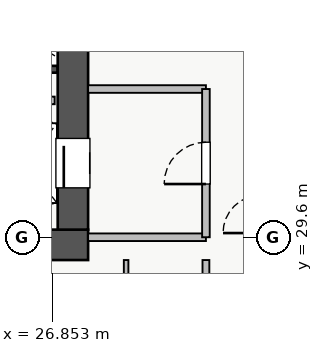
"""IFC4 building model, lengths in metres.
Left out: names, types, materials, properties, quantities, classifications, styles, units other than length and angle.
Written with IfcOpenShell. Run it as: python <this file> out.ifc"""

import sys

from ifc_helpers import new_model, si_unit, direction, frame, frame_2d, origin, place, context, subcontext, project, spatial, rectangle, extrude, source, transform, mapped, element, fill, save


model = new_model("IFC4")
c1 = context("Model", 3, precision=1e-05, world=origin(), true_north=direction((0.0, 1.0)))
c2 = subcontext(c1, "Body", "Model", "MODEL_VIEW")
j1 = project(units=[si_unit("LENGTHUNIT", "METRE"), si_unit("PLANEANGLEUNIT", "RADIAN")], contexts=[c1])
p1 = place(None, origin())
s1 = spatial("IfcSite", under=j1, at=p1, CompositionType="ELEMENT")
p2 = place(p1, origin())
s2 = spatial("IfcBuilding", under=s1, at=p2, CompositionType="ELEMENT")
p3 = place(p2, frame((0.0, 0.0, 39.25)))
s3 = spatial("IfcBuildingStorey", under=s2, at=p3, CompositionType="ELEMENT", Elevation=39.25)
p4 = place(p3, frame((25.8, 34.02, 0.0), z_axis=(0.0, 0.0, 1.0), x_axis=(1.0, 0.0, 0.0)))
e1 = element("IfcWall", 1, at=p4, inside=s3, PredefinedType="SHEAR", context=c2, shape_type="SweptSolid", body=[
    extrude(rectangle(XDim=1.2, YDim=0.18, at=frame_2d((0.6, 0.0))), origin(), (0.0, 0.0, 1.0), 3.07),
])
p5 = place(p3, frame((10.2, 29.4, 0.0), z_axis=(0.0, 0.0, 1.0), x_axis=(1.0, 0.0, 0.0)))
e2 = element("IfcWall", 2, at=p5, inside=s3, PredefinedType="SHEAR", context=c2, shape_type="SweptSolid", body=[
    extrude(rectangle(XDim=17.6, YDim=0.8, at=frame_2d((8.8, 0.0))), origin(), (0.0, 0.0, 1.0), 3.25),
])
p6 = place(p3, frame((27.4, 29.8, 0.0), z_axis=(0.0, 0.0, 1.0), x_axis=(0.0, 1.0, 0.0)))
e3 = element("IfcWall", 3, at=p6, inside=s3, PredefinedType="SHEAR", context=c2, shape_type="SweptSolid", body=[
    extrude(rectangle(XDim=5.6, YDim=0.8, at=frame_2d((2.8, 0.0))), origin(), (0.0, 0.0, 1.0), 3.25),
])
p7 = place(p6, frame((1.1, 0.0, 0.0)))
e4 = element("IfcOpeningElement", 4, at=p7, cuts=e3, PredefinedType="OPENING", context=c2, shape_type="SweptSolid", body=[
    extrude(rectangle(XDim=1.3, YDim=2.05, at=frame_2d((0.65, 1.025))), frame((0.0, 0.41, 0.0), z_axis=(0.0, -1.0, 0.0), x_axis=(1.0, 0.0, 0.0)), (0.0, 0.0, 1.0), 0.82),
])
for number, where, z_axis, x_axis in (
    (5, (27.8, 29.6, 0.0), (0.0, 0.0, 1.0), (1.0, 0.0, 0.0)),
    (6, (27.8, 33.5, 0.0), (0.0, 0.0, 1.0), (1.0, 0.0, 0.0)),
):
    element("IfcWall", number, at=place(p3, frame(where, z_axis=z_axis, x_axis=x_axis)), inside=s3, PredefinedType="PARTITIONING", context=c2, shape_type="SweptSolid", body=[
        extrude(rectangle(XDim=3.1, YDim=0.2, at=frame_2d((1.55, 0.0))), origin(), (0.0, 0.0, 1.0), 3.07),
    ])
p8 = place(p3, frame((30.9, 29.6, 0.0), z_axis=(0.0, 0.0, 1.0), x_axis=(0.0, 1.0, 0.0)))
e7 = element("IfcWall", 7, at=p8, inside=s3, PredefinedType="PARTITIONING", context=c2, shape_type="SweptSolid", body=[
    extrude(rectangle(XDim=3.9, YDim=0.2, at=frame_2d((1.95, 0.0))), origin(), (0.0, 0.0, 1.0), 3.07),
])
p9 = place(p8, frame((1.4, 0.0, 0.0)))
e8 = element("IfcOpeningElement", 8, at=p9, cuts=e7, PredefinedType="OPENING", context=c2, shape_type="SweptSolid", body=[
    extrude(rectangle(XDim=1.1, YDim=2.05, at=frame_2d((0.55, 1.025))), frame((0.0, 0.11, 0.0), z_axis=(0.0, -1.0, 0.0), x_axis=(1.0, 0.0, 0.0)), (0.0, 0.0, 1.0), 0.22),
])
p10 = place(p3, frame((21.75, 33.2, 0.0), z_axis=(0.0, 0.0, 1.0), x_axis=(1.0, 0.0, 0.0)))
e9 = element("IfcWall", 9, at=p10, inside=s3, PredefinedType="PARTITIONING", context=c2, shape_type="SweptSolid", body=[
    extrude(rectangle(XDim=5.17, YDim=0.2, at=frame_2d((2.585, 0.0))), origin(), (0.0, 0.0, 1.0), 3.07),
])
p11 = place(p3, frame((28.8, 23.1, 0.0), z_axis=(0.0, 0.0, 1.0), x_axis=(0.0, 1.0, 0.0)))
e10 = element("IfcWall", 10, at=p11, inside=s3, PredefinedType="PLUMBINGWALL", context=c2, shape_type="SweptSolid", body=[
    extrude(rectangle(XDim=5.9, YDim=0.12, at=frame_2d((2.95, 0.0))), origin(), (0.0, 0.0, 1.0), 3.07),
])
p12 = place(p3, frame((30.9, 17.0, 0.0), z_axis=(0.0, 0.0, 1.0), x_axis=(0.0, 1.0, 0.0)))
e11 = element("IfcWall", 11, at=p12, inside=s3, PredefinedType="PARTITIONING", context=c2, shape_type="SweptSolid", body=[
    extrude(rectangle(XDim=12.0, YDim=0.18, at=frame_2d((6.0, 0.0))), origin(), (0.0, 0.0, 1.0), 3.07),
])
p13 = place(p12, frame((2.36, 0.0, 0.0)))
e12 = element("IfcOpeningElement", 12, at=p13, cuts=e11, PredefinedType="OPENING", context=c2, shape_type="SweptSolid", body=[
    extrude(rectangle(XDim=1.0, YDim=2.05, at=frame_2d((0.5, 1.025))), frame((0.0, 0.1, 0.0), z_axis=(0.0, -1.0, 0.0), x_axis=(1.0, 0.0, 0.0)), (0.0, 0.0, 1.0), 0.2),
])
m1 = source(origin(), c2, "Body", "SweptSolid", [
    extrude(rectangle(XDim=1.3, YDim=2.05, at=frame_2d((0.65, 1.025))), frame((0.0, 0.025, 0.0), z_axis=(0.0, -1.0, 0.0), x_axis=(1.0, 0.0, 0.0)), (0.0, 0.0, 1.0), 0.05),
])
p14 = place(p7, origin())
e13 = element("IfcDoor", 13, at=p14, inside=s3, OperationType="SLIDING_TO_LEFT", PredefinedType="DOOR", context=c2, shape_type="MappedRepresentation", body=[
    mapped(m1, transform((0.0, 0.0, 0.0), x_axis=(1.0, 0.0, 0.0), y_axis=(0.0, 1.0, 0.0), z_axis=(0.0, 0.0, 1.0), scale=1.0)),
])
fill(e4, e13)
m2 = source(origin(), c2, "Body", "SweptSolid", [
    extrude(rectangle(XDim=1.1, YDim=2.05, at=frame_2d((0.55, 1.025))), frame((0.0, 0.025, 0.0), z_axis=(0.0, -1.0, 0.0), x_axis=(1.0, 0.0, 0.0)), (0.0, 0.0, 1.0), 0.05),
])
p15 = place(p9, origin())
e14 = element("IfcDoor", 14, at=p15, inside=s3, OperationType="SINGLE_SWING_LEFT", PredefinedType="DOOR", context=c2, shape_type="MappedRepresentation", body=[
    mapped(m2, transform((0.0, 0.0, 0.0), x_axis=(1.0, 0.0, 0.0), y_axis=(0.0, 1.0, 0.0), z_axis=(0.0, 0.0, 1.0), scale=1.0)),
])
fill(e8, e14)
save(model, sys.argv[1])
